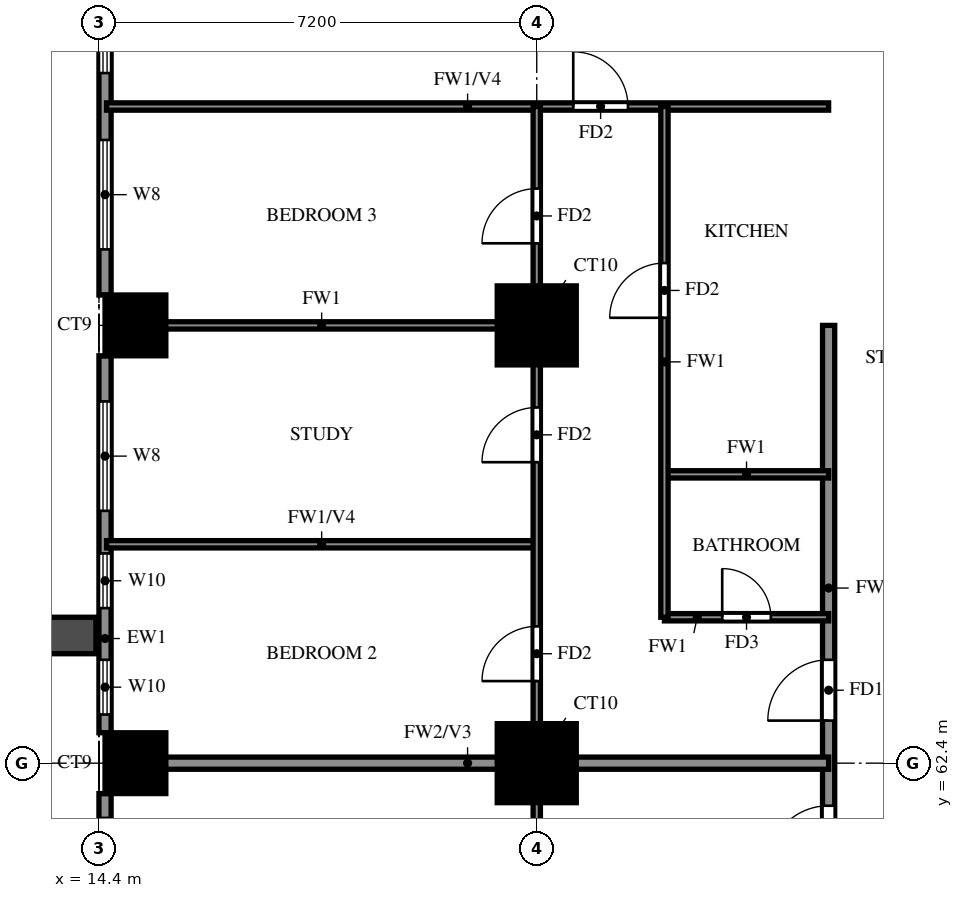
"""IFC4 building model, lengths in metres.
Left out: names, types, materials, properties, quantities, classifications, styles, units other than length and angle.
Written with IfcOpenShell. Run it as: python <this file> out.ifc"""

import sys

from ifc_helpers import new_model, si_unit, direction, frame, frame_2d, origin, origin_2d, place, context, subcontext, project, spatial, rectangle, extrude, source, transform, mapped, element, fill, save


model = new_model("IFC4")
c1 = context("Model", 3, precision=1e-05, world=origin(), true_north=direction((0.0, 1.0)))
c2 = subcontext(c1, "Body", "Model", "MODEL_VIEW")
j1 = project(units=[si_unit("LENGTHUNIT", "METRE"), si_unit("PLANEANGLEUNIT", "RADIAN")], contexts=[c1])
p1 = place(None, origin())
s1 = spatial("IfcSite", under=j1, at=p1, CompositionType="ELEMENT")
p2 = place(p1, origin())
s2 = spatial("IfcBuilding", under=s1, at=p2, CompositionType="ELEMENT")
p3 = place(p2, frame((0.0, 0.0, 65.5)))
s3 = spatial("IfcBuildingStorey", under=s2, at=p3, CompositionType="ELEMENT", Elevation=65.5)
m1 = source(origin(), c2, "Body", "SweptSolid", [
    extrude(rectangle(XDim=1.0, YDim=1.0, at=origin_2d()), origin(), (0.0, 0.0, 1.0), 3.18),
])
p4 = place(p3, frame((15.0, 62.4, 0.0), z_axis=(0.0, 0.0, 1.0), x_axis=(1.0, 0.0, 0.0)))
e1 = element("IfcColumn", 1, at=p4, inside=s3, PredefinedType="COLUMN", context=c2, shape_type="MappedRepresentation", body=[
    mapped(m1, transform((0.0, 0.0, 0.0))),
])
m2 = source(origin(), c2, "Body", "SweptSolid", [
    extrude(rectangle(XDim=1.3, YDim=1.3, at=origin_2d()), origin(), (0.0, 0.0, 1.0), 3.18),
])
p5 = place(p3, frame((21.6, 62.4, 0.0), z_axis=(0.0, 0.0, 1.0), x_axis=(1.0, 0.0, 0.0)))
e2 = element("IfcColumn", 2, at=p5, inside=s3, PredefinedType="COLUMN", context=c2, shape_type="MappedRepresentation", body=[
    mapped(m2, transform((0.0, 0.0, 0.0))),
])
p6 = place(p3, frame((15.0, 69.6, 0.0), z_axis=(0.0, 0.0, 1.0), x_axis=(1.0, 0.0, 0.0)))
e3 = element("IfcColumn", 3, at=p6, inside=s3, PredefinedType="COLUMN", context=c2, shape_type="MappedRepresentation", body=[
    mapped(m1, transform((0.0, 0.0, 0.0))),
])
p7 = place(p3, frame((21.6, 69.6, 0.0), z_axis=(0.0, 0.0, 1.0), x_axis=(1.0, 0.0, 0.0)))
e4 = element("IfcColumn", 4, at=p7, inside=s3, PredefinedType="COLUMN", context=c2, shape_type="MappedRepresentation", body=[
    mapped(m2, transform((0.0, 0.0, 0.0))),
])
p8 = place(p3, frame((14.5, 76.3, 0.0), z_axis=(0.0, 0.0, 1.0), x_axis=(0.0, -1.0, 0.0)))
e5 = element("IfcWall", 5, at=p8, inside=s3, PredefinedType="SOLIDWALL", context=c2, shape_type="SweptSolid", body=[
    extrude(rectangle(XDim=6.2, YDim=0.2, at=frame_2d((3.1, 0.0))), origin(), (0.0, 0.0, 1.0), 3.18),
])
p9 = place(p8, frame((3.65, 0.0, 0.6)))
e6 = element("IfcOpeningElement", 6, at=p9, cuts=e5, PredefinedType="OPENING", context=c2, shape_type="SweptSolid", body=[
    extrude(rectangle(XDim=1.8, YDim=2.4, at=frame_2d((0.9, 1.2))), frame((0.0, 0.11, 0.0), z_axis=(0.0, -1.0, 0.0), x_axis=(1.0, 0.0, 0.0)), (0.0, 0.0, 1.0), 0.22),
])
p10 = place(p8, frame((0.75, 0.0, 0.6)))
e7 = element("IfcOpeningElement", 7, at=p10, cuts=e5, PredefinedType="OPENING", context=c2, shape_type="SweptSolid", body=[
    extrude(rectangle(XDim=1.8, YDim=2.4, at=frame_2d((0.9, 1.2))), frame((0.0, 0.11, 0.0), z_axis=(0.0, -1.0, 0.0), x_axis=(1.0, 0.0, 0.0)), (0.0, 0.0, 1.0), 0.22),
])
p11 = place(p3, frame((14.5, 69.1, 0.0), z_axis=(0.0, 0.0, 1.0), x_axis=(0.0, -1.0, 0.0)))
e8 = element("IfcWall", 8, at=p11, inside=s3, PredefinedType="SOLIDWALL", context=c2, shape_type="SweptSolid", body=[
    extrude(rectangle(XDim=6.2, YDim=0.2, at=frame_2d((3.1, 0.0))), origin(), (0.0, 0.0, 1.0), 3.18),
])
p12 = place(p11, frame((3.25, 0.0, 0.6)))
e9 = element("IfcOpeningElement", 9, at=p12, cuts=e8, PredefinedType="OPENING", context=c2, shape_type="SweptSolid", body=[
    extrude(rectangle(XDim=0.9, YDim=2.4, at=frame_2d((0.45, 1.2))), frame((0.0, 0.11, 0.0), z_axis=(0.0, -1.0, 0.0), x_axis=(1.0, 0.0, 0.0)), (0.0, 0.0, 1.0), 0.22),
])
p13 = place(p11, frame((5.0, 0.0, 0.6)))
e10 = element("IfcOpeningElement", 10, at=p13, cuts=e8, PredefinedType="OPENING", context=c2, shape_type="SweptSolid", body=[
    extrude(rectangle(XDim=0.9, YDim=2.4, at=frame_2d((0.45, 1.2))), frame((0.0, 0.11, 0.0), z_axis=(0.0, -1.0, 0.0), x_axis=(1.0, 0.0, 0.0)), (0.0, 0.0, 1.0), 0.22),
])
p14 = place(p11, frame((0.75, 0.0, 0.6)))
e11 = element("IfcOpeningElement", 11, at=p14, cuts=e8, PredefinedType="OPENING", context=c2, shape_type="SweptSolid", body=[
    extrude(rectangle(XDim=1.8, YDim=2.4, at=frame_2d((0.9, 1.2))), frame((0.0, 0.11, 0.0), z_axis=(0.0, -1.0, 0.0), x_axis=(1.0, 0.0, 0.0)), (0.0, 0.0, 1.0), 0.22),
])
p15 = place(p3, frame((14.5, 61.9, 0.0), z_axis=(0.0, 0.0, 1.0), x_axis=(0.0, -1.0, 0.0)))
e12 = element("IfcWall", 12, at=p15, inside=s3, PredefinedType="SOLIDWALL", context=c2, shape_type="SweptSolid", body=[
    extrude(rectangle(XDim=6.2, YDim=0.2, at=frame_2d((3.1, 0.0))), origin(), (0.0, 0.0, 1.0), 3.18),
])
p16 = place(p15, frame((0.4, 0.0, 0.0)))
e13 = element("IfcOpeningElement", 13, at=p16, cuts=e12, PredefinedType="OPENING", context=c2, shape_type="SweptSolid", body=[
    extrude(rectangle(XDim=1.8, YDim=2.4, at=frame_2d((0.9, 1.2))), frame((0.0, 0.11, 0.0), z_axis=(0.0, -1.0, 0.0), x_axis=(1.0, 0.0, 0.0)), (0.0, 0.0, 1.0), 0.22),
])
p17 = place(p15, frame((2.65, 0.0, 0.6)))
e14 = element("IfcOpeningElement", 14, at=p17, cuts=e12, PredefinedType="OPENING", context=c2, shape_type="SweptSolid", body=[
    extrude(rectangle(XDim=0.9, YDim=2.4, at=frame_2d((0.45, 1.2))), frame((0.0, 0.11, 0.0), z_axis=(0.0, -1.0, 0.0), x_axis=(1.0, 0.0, 0.0)), (0.0, 0.0, 1.0), 0.22),
])
p18 = place(p15, frame((4.55, 0.0, 0.6)))
e15 = element("IfcOpeningElement", 15, at=p18, cuts=e12, PredefinedType="OPENING", context=c2, shape_type="SweptSolid", body=[
    extrude(rectangle(XDim=1.2, YDim=2.4, at=frame_2d((0.6, 1.2))), frame((0.0, 0.11, 0.0), z_axis=(0.0, -1.0, 0.0), x_axis=(1.0, 0.0, 0.0)), (0.0, 0.0, 1.0), 0.22),
])
p19 = place(p3, frame((14.35, 64.5, 0.0), z_axis=(0.0, 0.0, 1.0), x_axis=(-1.0, 0.0, 0.0)))
e16 = element("IfcWall", 16, at=p19, inside=s3, PredefinedType="SOLIDWALL", context=c2, shape_type="SweptSolid", body=[
    extrude(rectangle(XDim=2.65, YDim=0.6, at=frame_2d((1.325, 0.0))), origin(), (0.0, 0.0, 1.0), 2.85),
])
p20 = place(p3, frame((26.4, 60.0, 0.0), z_axis=(0.0, 0.0, 1.0), x_axis=(0.0, 1.0, 0.0)))
e17 = element("IfcWall", 17, at=p20, inside=s3, PredefinedType="SOLIDWALL", context=c2, shape_type="SweptSolid", body=[
    extrude(rectangle(XDim=9.6, YDim=0.2, at=frame_2d((4.8, 0.0))), origin(), (0.0, 0.0, 1.0), 3.18),
])
p21 = place(p20, frame((0.7, 0.0, 0.0)))
e18 = element("IfcOpeningElement", 18, at=p21, cuts=e17, PredefinedType="OPENING", context=c2, shape_type="SweptSolid", body=[
    extrude(rectangle(XDim=1.0, YDim=2.1, at=frame_2d((0.5, 1.05))), frame((0.0, 0.11, 0.0), z_axis=(0.0, -1.0, 0.0), x_axis=(1.0, 0.0, 0.0)), (0.0, 0.0, 1.0), 0.22),
])
p22 = place(p20, frame((3.1, 0.0, 0.0)))
e19 = element("IfcOpeningElement", 19, at=p22, cuts=e17, PredefinedType="OPENING", context=c2, shape_type="SweptSolid", body=[
    extrude(rectangle(XDim=1.0, YDim=2.1, at=frame_2d((0.5, 1.05))), frame((0.0, 0.11, 0.0), z_axis=(0.0, -1.0, 0.0), x_axis=(1.0, 0.0, 0.0)), (0.0, 0.0, 1.0), 0.22),
])
p23 = place(p3, frame((14.525, 62.4, 0.0), z_axis=(0.0, 0.0, 1.0), x_axis=(1.0, 0.0, 0.0)))
e20 = element("IfcWall", 20, at=p23, inside=s3, PredefinedType="SOLIDWALL", context=c2, shape_type="SweptSolid", body=[
    extrude(rectangle(XDim=11.875, YDim=0.2, at=frame_2d((5.938, 0.0))), origin(), (0.0, 0.0, 1.0), 3.18),
])
p24 = place(p3, frame((23.7, 64.8, 0.0), z_axis=(0.0, 0.0, 1.0), x_axis=(1.0, 0.0, 0.0)))
e21 = element("IfcWall", 21, at=p24, inside=s3, PredefinedType="PARTITIONING", context=c2, shape_type="SweptSolid", body=[
    extrude(rectangle(XDim=2.7, YDim=0.12, at=frame_2d((1.35, 0.0))), origin(), (0.0, 0.0, 1.0), 3.18),
])
p25 = place(p24, frame((0.95, 0.0, 0.0)))
e22 = element("IfcOpeningElement", 22, at=p25, cuts=e21, PredefinedType="OPENING", context=c2, shape_type="SweptSolid", body=[
    extrude(rectangle(XDim=0.8, YDim=2.1, at=frame_2d((0.4, 1.05))), frame((0.0, 0.07, 0.0), z_axis=(0.0, -1.0, 0.0), x_axis=(1.0, 0.0, 0.0)), (0.0, 0.0, 1.0), 0.14),
])
p26 = place(p3, frame((14.525, 66.0, 0.0), z_axis=(0.0, 0.0, 1.0), x_axis=(1.0, 0.0, 0.0)))
e23 = element("IfcWall", 23, at=p26, inside=s3, PredefinedType="PARTITIONING", context=c2, shape_type="SweptSolid", body=[
    extrude(rectangle(XDim=7.075, YDim=0.12, at=frame_2d((3.538, 0.0))), origin(), (0.0, 0.0, 1.0), 2.28),
])
p27 = place(p3, frame((23.7, 67.15, 0.0), z_axis=(0.0, 0.0, 1.0), x_axis=(1.0, 0.0, 0.0)))
e24 = element("IfcWall", 24, at=p27, inside=s3, PredefinedType="PARTITIONING", context=c2, shape_type="SweptSolid", body=[
    extrude(rectangle(XDim=2.7, YDim=0.12, at=frame_2d((1.35, 0.0))), origin(), (0.0, 0.0, 1.0), 3.18),
])
p28 = place(p3, frame((14.525, 69.6, 0.0), z_axis=(0.0, 0.0, 1.0), x_axis=(1.0, 0.0, 0.0)))
e25 = element("IfcWall", 25, at=p28, inside=s3, PredefinedType="PARTITIONING", context=c2, shape_type="SweptSolid", body=[
    extrude(rectangle(XDim=7.075, YDim=0.12, at=frame_2d((3.538, 0.0))), origin(), (0.0, 0.0, 1.0), 3.18),
])
p29 = place(p3, frame((14.525, 73.2, 0.0), z_axis=(0.0, 0.0, 1.0), x_axis=(1.0, 0.0, 0.0)))
e26 = element("IfcWall", 26, at=p29, inside=s3, PredefinedType="PARTITIONING", context=c2, shape_type="SweptSolid", body=[
    extrude(rectangle(XDim=11.875, YDim=0.12, at=frame_2d((5.938, 0.0))), origin(), (0.0, 0.0, 1.0), 2.28),
])
p30 = place(p29, frame((7.675, 0.0, 0.0)))
e27 = element("IfcOpeningElement", 27, at=p30, cuts=e26, PredefinedType="OPENING", context=c2, shape_type="SweptSolid", body=[
    extrude(rectangle(XDim=0.9, YDim=2.1, at=frame_2d((0.45, 1.05))), frame((0.0, 0.07, 0.0), z_axis=(0.0, -1.0, 0.0), x_axis=(1.0, 0.0, 0.0)), (0.0, 0.0, 1.0), 0.14),
])
p31 = place(p3, frame((21.6, 33.725, 0.0), z_axis=(0.0, 0.0, 1.0), x_axis=(0.0, 1.0, 0.0)))
e28 = element("IfcWall", 28, at=p31, inside=s3, PredefinedType="PARTITIONING", context=c2, shape_type="SweptSolid", body=[
    extrude(rectangle(XDim=39.475, YDim=0.12, at=frame_2d((19.737, 0.0))), origin(), (0.0, 0.0, 1.0), 3.18),
])
p32 = place(p31, frame((7.775, 0.0, 0.0)))
e29 = element("IfcOpeningElement", 29, at=p32, cuts=e28, PredefinedType="OPENING", context=c2, shape_type="SweptSolid", body=[
    extrude(rectangle(XDim=0.9, YDim=2.1, at=frame_2d((0.45, 1.05))), frame((0.0, 0.07, 0.0), z_axis=(0.0, -1.0, 0.0), x_axis=(1.0, 0.0, 0.0)), (0.0, 0.0, 1.0), 0.14),
])
p33 = place(p31, frame((15.625, 0.0, 0.0)))
e30 = element("IfcOpeningElement", 30, at=p33, cuts=e28, PredefinedType="OPENING", context=c2, shape_type="SweptSolid", body=[
    extrude(rectangle(XDim=0.9, YDim=2.1, at=frame_2d((0.45, 1.05))), frame((0.0, 0.07, 0.0), z_axis=(0.0, -1.0, 0.0), x_axis=(1.0, 0.0, 0.0)), (0.0, 0.0, 1.0), 0.14),
])
p34 = place(p31, frame((19.225, 0.0, 0.0)))
e31 = element("IfcOpeningElement", 31, at=p34, cuts=e28, PredefinedType="OPENING", context=c2, shape_type="SweptSolid", body=[
    extrude(rectangle(XDim=0.9, YDim=2.1, at=frame_2d((0.45, 1.05))), frame((0.0, 0.07, 0.0), z_axis=(0.0, -1.0, 0.0), x_axis=(1.0, 0.0, 0.0)), (0.0, 0.0, 1.0), 0.14),
])
p35 = place(p31, frame((24.325, 0.0, 0.0)))
e32 = element("IfcOpeningElement", 32, at=p35, cuts=e28, PredefinedType="OPENING", context=c2, shape_type="SweptSolid", body=[
    extrude(rectangle(XDim=1.5, YDim=2.1, at=frame_2d((0.75, 1.05))), frame((0.0, 0.07, 0.0), z_axis=(0.0, -1.0, 0.0), x_axis=(1.0, 0.0, 0.0)), (0.0, 0.0, 1.0), 0.14),
])
p36 = place(p31, frame((30.025, 0.0, 0.0)))
e33 = element("IfcOpeningElement", 33, at=p36, cuts=e28, PredefinedType="OPENING", context=c2, shape_type="SweptSolid", body=[
    extrude(rectangle(XDim=0.9, YDim=2.1, at=frame_2d((0.45, 1.05))), frame((0.0, 0.07, 0.0), z_axis=(0.0, -1.0, 0.0), x_axis=(1.0, 0.0, 0.0)), (0.0, 0.0, 1.0), 0.14),
])
p37 = place(p31, frame((33.625, 0.0, 0.0)))
e34 = element("IfcOpeningElement", 34, at=p37, cuts=e28, PredefinedType="OPENING", context=c2, shape_type="SweptSolid", body=[
    extrude(rectangle(XDim=0.9, YDim=2.1, at=frame_2d((0.45, 1.05))), frame((0.0, 0.07, 0.0), z_axis=(0.0, -1.0, 0.0), x_axis=(1.0, 0.0, 0.0)), (0.0, 0.0, 1.0), 0.14),
])
p38 = place(p31, frame((37.225, 0.0, 0.0)))
e35 = element("IfcOpeningElement", 35, at=p38, cuts=e28, PredefinedType="OPENING", context=c2, shape_type="SweptSolid", body=[
    extrude(rectangle(XDim=0.9, YDim=2.1, at=frame_2d((0.45, 1.05))), frame((0.0, 0.07, 0.0), z_axis=(0.0, -1.0, 0.0), x_axis=(1.0, 0.0, 0.0)), (0.0, 0.0, 1.0), 0.14),
])
p39 = place(p3, frame((23.7, 64.8, 0.0), z_axis=(0.0, 0.0, 1.0), x_axis=(0.0, 1.0, 0.0)))
e36 = element("IfcWall", 36, at=p39, inside=s3, PredefinedType="PARTITIONING", context=c2, shape_type="SweptSolid", body=[
    extrude(rectangle(XDim=8.4, YDim=0.12, at=frame_2d((4.2, 0.0))), origin(), (0.0, 0.0, 1.0), 3.18),
])
p40 = place(p39, frame((4.925, 0.0, 0.0)))
e37 = element("IfcOpeningElement", 37, at=p40, cuts=e36, PredefinedType="OPENING", context=c2, shape_type="SweptSolid", body=[
    extrude(rectangle(XDim=0.9, YDim=2.1, at=frame_2d((0.45, 1.05))), frame((0.0, 0.07, 0.0), z_axis=(0.0, -1.0, 0.0), x_axis=(1.0, 0.0, 0.0)), (0.0, 0.0, 1.0), 0.14),
])
p41 = place(p9, origin())
e38 = element("IfcWindow", 38, at=p41, inside=s3, PartitioningType="DOUBLE_PANEL_VERTICAL", PredefinedType="WINDOW", context=c2, shape_type="SweptSolid", body=[
    extrude(rectangle(XDim=1.8, YDim=2.4, at=frame_2d((0.9, 1.2))), frame((0.0, 0.03, 0.0), z_axis=(0.0, -1.0, 0.0), x_axis=(1.0, 0.0, 0.0)), (0.0, 0.0, 1.0), 0.06),
])
fill(e6, e38)
p42 = place(p10, origin())
e39 = element("IfcWindow", 39, at=p42, inside=s3, PartitioningType="DOUBLE_PANEL_VERTICAL", PredefinedType="WINDOW", context=c2, shape_type="SweptSolid", body=[
    extrude(rectangle(XDim=1.8, YDim=2.4, at=frame_2d((0.9, 1.2))), frame((0.0, 0.03, 0.0), z_axis=(0.0, -1.0, 0.0), x_axis=(1.0, 0.0, 0.0)), (0.0, 0.0, 1.0), 0.06),
])
fill(e7, e39)
p43 = place(p12, origin())
e40 = element("IfcWindow", 40, at=p43, inside=s3, PartitioningType="SINGLE_PANEL", PredefinedType="WINDOW", context=c2, shape_type="SweptSolid", body=[
    extrude(rectangle(XDim=0.9, YDim=2.4, at=frame_2d((0.45, 1.2))), frame((0.0, 0.03, 0.0), z_axis=(0.0, -1.0, 0.0), x_axis=(1.0, 0.0, 0.0)), (0.0, 0.0, 1.0), 0.06),
])
fill(e9, e40)
p44 = place(p13, origin())
e41 = element("IfcWindow", 41, at=p44, inside=s3, PartitioningType="SINGLE_PANEL", PredefinedType="WINDOW", context=c2, shape_type="SweptSolid", body=[
    extrude(rectangle(XDim=0.9, YDim=2.4, at=frame_2d((0.45, 1.2))), frame((0.0, 0.03, 0.0), z_axis=(0.0, -1.0, 0.0), x_axis=(1.0, 0.0, 0.0)), (0.0, 0.0, 1.0), 0.06),
])
fill(e10, e41)
p45 = place(p14, origin())
e42 = element("IfcWindow", 42, at=p45, inside=s3, PartitioningType="DOUBLE_PANEL_VERTICAL", PredefinedType="WINDOW", context=c2, shape_type="SweptSolid", body=[
    extrude(rectangle(XDim=1.8, YDim=2.4, at=frame_2d((0.9, 1.2))), frame((0.0, 0.03, 0.0), z_axis=(0.0, -1.0, 0.0), x_axis=(1.0, 0.0, 0.0)), (0.0, 0.0, 1.0), 0.06),
])
fill(e11, e42)
p46 = place(p16, origin())
e43 = element("IfcDoor", 43, at=p46, inside=s3, OperationType="DOUBLE_DOOR_SLIDING", PredefinedType="DOOR", context=c2, shape_type="SweptSolid", body=[
    extrude(rectangle(XDim=1.8, YDim=2.4, at=frame_2d((0.9, 1.2))), frame((0.0, 0.025, 0.0), z_axis=(0.0, -1.0, 0.0), x_axis=(1.0, 0.0, 0.0)), (0.0, 0.0, 1.0), 0.05),
])
fill(e13, e43)
p47 = place(p21, origin())
e44 = element("IfcDoor", 44, at=p47, inside=s3, OperationType="SINGLE_SWING_RIGHT", PredefinedType="DOOR", context=c2, shape_type="SweptSolid", body=[
    extrude(rectangle(XDim=1.0, YDim=2.1, at=frame_2d((0.5, 1.05))), frame((0.0, 0.025, 0.0), z_axis=(0.0, -1.0, 0.0), x_axis=(1.0, 0.0, 0.0)), (0.0, 0.0, 1.0), 0.05),
])
fill(e18, e44)
p48 = place(p22, origin())
e45 = element("IfcDoor", 45, at=p48, inside=s3, OperationType="SINGLE_SWING_RIGHT", PredefinedType="DOOR", context=c2, shape_type="SweptSolid", body=[
    extrude(rectangle(XDim=1.0, YDim=2.1, at=frame_2d((0.5, 1.05))), frame((0.0, 0.025, 0.0), z_axis=(0.0, -1.0, 0.0), x_axis=(1.0, 0.0, 0.0)), (0.0, 0.0, 1.0), 0.05),
])
fill(e19, e45)
p49 = place(p36, origin())
e46 = element("IfcDoor", 46, at=p49, inside=s3, OperationType="SINGLE_SWING_LEFT", PredefinedType="DOOR", context=c2, shape_type="SweptSolid", body=[
    extrude(rectangle(XDim=0.9, YDim=2.1, at=frame_2d((0.45, 1.05))), frame((0.0, 0.025, 0.0), z_axis=(0.0, -1.0, 0.0), x_axis=(1.0, 0.0, 0.0)), (0.0, 0.0, 1.0), 0.05),
])
fill(e33, e46)
p50 = place(p37, origin())
e47 = element("IfcDoor", 47, at=p50, inside=s3, OperationType="SINGLE_SWING_LEFT", PredefinedType="DOOR", context=c2, shape_type="SweptSolid", body=[
    extrude(rectangle(XDim=0.9, YDim=2.1, at=frame_2d((0.45, 1.05))), frame((0.0, 0.025, 0.0), z_axis=(0.0, -1.0, 0.0), x_axis=(1.0, 0.0, 0.0)), (0.0, 0.0, 1.0), 0.05),
])
fill(e34, e47)
p51 = place(p38, origin())
e48 = element("IfcDoor", 48, at=p51, inside=s3, OperationType="SINGLE_SWING_RIGHT", PredefinedType="DOOR", context=c2, shape_type="SweptSolid", body=[
    extrude(rectangle(XDim=0.9, YDim=2.1, at=frame_2d((0.45, 1.05))), frame((0.0, 0.025, 0.0), z_axis=(0.0, -1.0, 0.0), x_axis=(1.0, 0.0, 0.0)), (0.0, 0.0, 1.0), 0.05),
])
fill(e35, e48)
p52 = place(p30, origin())
e49 = element("IfcDoor", 49, at=p52, inside=s3, OperationType="SINGLE_SWING_LEFT", PredefinedType="DOOR", context=c2, shape_type="SweptSolid", body=[
    extrude(rectangle(XDim=0.9, YDim=2.1, at=frame_2d((0.45, 1.05))), frame((0.0, 0.025, 0.0), z_axis=(0.0, -1.0, 0.0), x_axis=(1.0, 0.0, 0.0)), (0.0, 0.0, 1.0), 0.05),
])
fill(e27, e49)
p53 = place(p25, origin())
e50 = element("IfcDoor", 50, at=p53, inside=s3, OperationType="SINGLE_SWING_LEFT", PredefinedType="DOOR", context=c2, shape_type="SweptSolid", body=[
    extrude(rectangle(XDim=0.8, YDim=2.1, at=frame_2d((0.4, 1.05))), frame((0.0, 0.025, 0.0), z_axis=(0.0, -1.0, 0.0), x_axis=(1.0, 0.0, 0.0)), (0.0, 0.0, 1.0), 0.05),
])
fill(e22, e50)
p54 = place(p40, origin())
e51 = element("IfcDoor", 51, at=p54, inside=s3, OperationType="SINGLE_SWING_RIGHT", PredefinedType="DOOR", context=c2, shape_type="SweptSolid", body=[
    extrude(rectangle(XDim=0.9, YDim=2.1, at=frame_2d((0.45, 1.05))), frame((0.0, 0.025, 0.0), z_axis=(0.0, -1.0, 0.0), x_axis=(1.0, 0.0, 0.0)), (0.0, 0.0, 1.0), 0.05),
])
fill(e37, e51)
save(model, sys.argv[1])
